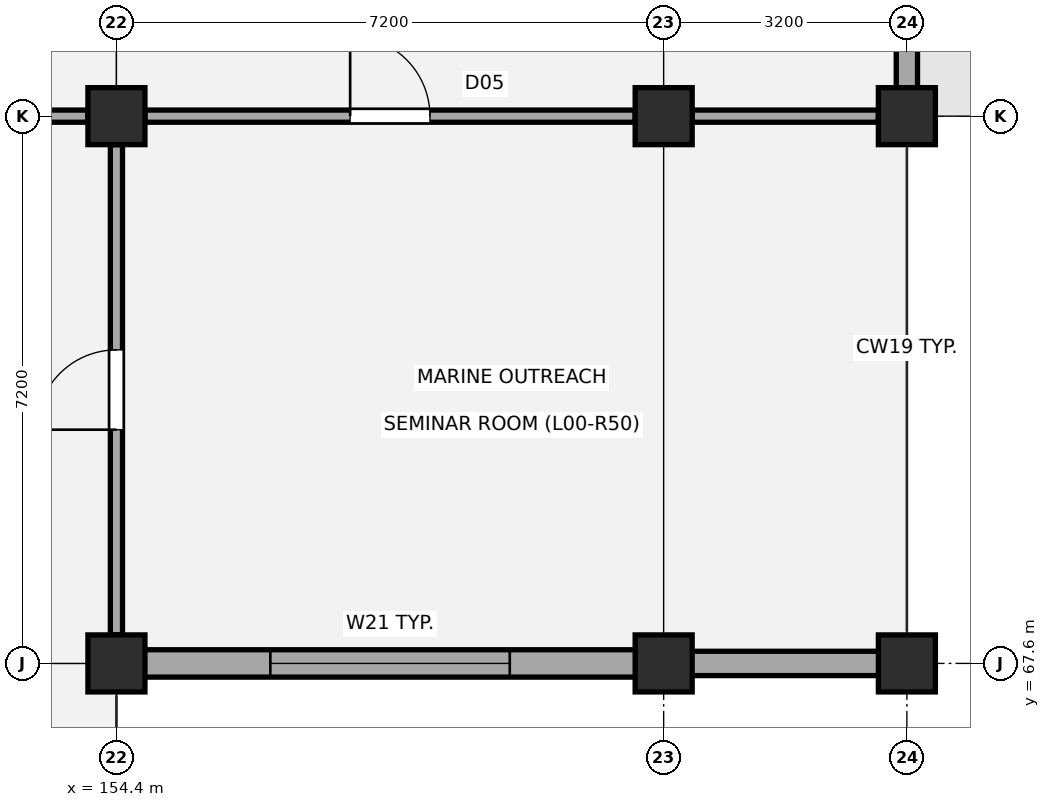
"""IFC4 building model, lengths in metres.
Left out: names, types, materials, properties, quantities, classifications, styles, units other than length and angle.
Written with IfcOpenShell. Run it as: python <this file> out.ifc"""

import sys

from ifc_helpers import new_model, si_unit, direction, frame, frame_2d, origin, origin_2d, place, context, subcontext, project, spatial, rectangle, circle, extrude, element, fill, save


model = new_model("IFC4")
c1 = context("Model", 3, precision=1e-05, world=origin(), true_north=direction((0.0, 1.0)))
c2 = subcontext(c1, "Body", "Model", "MODEL_VIEW")
j1 = project(units=[si_unit("LENGTHUNIT", "METRE"), si_unit("PLANEANGLEUNIT", "RADIAN")], contexts=[c1])
p1 = place(None, origin())
s1 = spatial("IfcSite", under=j1, at=p1, CompositionType="ELEMENT")
p2 = place(p1, origin())
s2 = spatial("IfcBuilding", under=s1, at=p2, CompositionType="ELEMENT")
p3 = place(p2, origin())
s3 = spatial("IfcBuildingStorey", under=s2, at=p3, CompositionType="ELEMENT", Elevation=0.0)
for number, where, z_axis, x_axis in (
    (1, (154.4, 67.6, -0.35), (0.0, 0.0, 1.0), (1.0, 0.0, 0.0)),
    (2, (154.4, 74.8, -0.35), (0.0, 0.0, 1.0), (1.0, 0.0, 0.0)),
    (3, (161.6, 67.6, -0.35), (0.0, 0.0, 1.0), (1.0, 0.0, 0.0)),
    (4, (161.6, 74.8, -0.35), (0.0, 0.0, 1.0), (1.0, 0.0, 0.0)),
    (5, (164.8, 67.6, -0.35), (0.0, 0.0, 1.0), (1.0, 0.0, 0.0)),
    (6, (164.8, 74.8, -0.35), (0.0, 0.0, 1.0), (1.0, 0.0, 0.0)),
):
    element("IfcColumn", number, at=place(p3, frame(where, z_axis=z_axis, x_axis=x_axis)), inside=s3, PredefinedType="COLUMN", context=c2, shape_type="SweptSolid", body=[
        extrude(circle(Radius=0.375, at=origin_2d()), origin(), (0.0, 0.0, 1.0), 5.03),
    ])
p4 = place(p3, frame((161.29, 67.6, 0.0), z_axis=(0.0, 0.0, 1.0), x_axis=(-1.0, 0.0, 0.0)))
e7 = element("IfcWall", 7, at=p4, inside=s3, PredefinedType="STANDARD", context=c2, shape_type="SweptSolid", body=[
    extrude(rectangle(XDim=6.58, YDim=0.36, at=frame_2d((3.29, 0.0))), origin(), (0.0, 0.0, 1.0), 3.75),
])
p5 = place(p4, frame((1.715, 0.0, 0.95)))
e8 = element("IfcOpeningElement", 8, at=p5, cuts=e7, PredefinedType="OPENING", context=c2, shape_type="SweptSolid", body=[
    extrude(rectangle(XDim=3.15, YDim=1.9, at=frame_2d((1.575, 0.95))), frame((0.0, 0.19, 0.0), z_axis=(0.0, -1.0, 0.0), x_axis=(1.0, 0.0, 0.0)), (0.0, 0.0, 1.0), 0.38),
])
p6 = place(p3, frame((164.49, 67.6, 0.0), z_axis=(0.0, 0.0, 1.0), x_axis=(-1.0, 0.0, 0.0)))
e9 = element("IfcWall", 9, at=p6, inside=s3, PredefinedType="STANDARD", context=c2, shape_type="SweptSolid", body=[
    extrude(rectangle(XDim=2.58, YDim=0.32, at=frame_2d((1.29, 0.0))), origin(), (0.0, 0.0, 1.0), 3.75),
])
p7 = place(p3, frame((164.8, 81.69, 0.0), z_axis=(0.0, 0.0, 1.0), x_axis=(0.0, -1.0, 0.0)))
e10 = element("IfcWall", 10, at=p7, inside=s3, PredefinedType="STANDARD", context=c2, shape_type="SweptSolid", body=[
    extrude(rectangle(XDim=6.58, YDim=0.28, at=frame_2d((3.29, 0.0))), origin(), (0.0, 0.0, 1.0), 3.75),
])
p8 = place(p7, frame((2.08, 0.0, 0.0)))
e11 = element("IfcOpeningElement", 11, at=p8, cuts=e10, PredefinedType="OPENING", context=c2, shape_type="SweptSolid", body=[
    extrude(rectangle(XDim=2.42, YDim=2.42, at=frame_2d((1.21, 1.21))), frame((0.0, 0.15, 0.0), z_axis=(0.0, -1.0, 0.0), x_axis=(1.0, 0.0, 0.0)), (0.0, 0.0, 1.0), 0.3),
])
p9 = place(p3, frame((154.4, 67.975, 0.0), z_axis=(0.0, 0.0, 1.0), x_axis=(0.0, 1.0, 0.0)))
e12 = element("IfcWall", 12, at=p9, inside=s3, PredefinedType="PARTITIONING", context=c2, shape_type="SweptSolid", body=[
    extrude(rectangle(XDim=6.45, YDim=0.16, at=frame_2d((3.225, 0.0))), origin(), (0.0, 0.0, 1.0), 3.62),
])
p10 = place(p9, frame((2.7, 0.0, 0.0)))
e13 = element("IfcOpeningElement", 13, at=p10, cuts=e12, PredefinedType="OPENING", context=c2, shape_type="SweptSolid", body=[
    extrude(rectangle(XDim=1.05, YDim=2.14, at=frame_2d((0.525, 1.07))), frame((0.0, 0.09, 0.0), z_axis=(0.0, -1.0, 0.0), x_axis=(1.0, 0.0, 0.0)), (0.0, 0.0, 1.0), 0.18),
])
p11 = place(p3, frame((147.6, 74.8, 0.0), z_axis=(0.0, 0.0, 1.0), x_axis=(1.0, 0.0, 0.0)))
e14 = element("IfcWall", 14, at=p11, inside=s3, PredefinedType="PARTITIONING", context=c2, shape_type="SweptSolid", body=[
    extrude(rectangle(XDim=6.425, YDim=0.16, at=frame_2d((3.212, 0.0))), origin(), (0.0, 0.0, 1.0), 3.52),
])
p12 = place(p11, frame((2.633, 0.0, 0.0)))
e15 = element("IfcOpeningElement", 15, at=p12, cuts=e14, PredefinedType="OPENING", context=c2, shape_type="SweptSolid", body=[
    extrude(rectangle(XDim=1.16, YDim=2.18, at=frame_2d((0.58, 1.09))), frame((0.0, 0.09, 0.0), z_axis=(0.0, -1.0, 0.0), x_axis=(1.0, 0.0, 0.0)), (0.0, 0.0, 1.0), 0.18),
])
p13 = place(p3, frame((154.775, 74.8, 0.0), z_axis=(0.0, 0.0, 1.0), x_axis=(1.0, 0.0, 0.0)))
e16 = element("IfcWall", 16, at=p13, inside=s3, PredefinedType="PARTITIONING", context=c2, shape_type="SweptSolid", body=[
    extrude(rectangle(XDim=6.45, YDim=0.16, at=frame_2d((3.225, 0.0))), origin(), (0.0, 0.0, 1.0), 3.7),
])
p14 = place(p13, frame((2.7, 0.0, 0.0)))
e17 = element("IfcOpeningElement", 17, at=p14, cuts=e16, PredefinedType="OPENING", context=c2, shape_type="SweptSolid", body=[
    extrude(rectangle(XDim=1.05, YDim=2.14, at=frame_2d((0.525, 1.07))), frame((0.0, 0.09, 0.0), z_axis=(0.0, -1.0, 0.0), x_axis=(1.0, 0.0, 0.0)), (0.0, 0.0, 1.0), 0.18),
])
p15 = place(p3, frame((161.975, 74.8, 0.0), z_axis=(0.0, 0.0, 1.0), x_axis=(1.0, 0.0, 0.0)))
e18 = element("IfcWall", 18, at=p15, inside=s3, PredefinedType="PARTITIONING", context=c2, shape_type="SweptSolid", body=[
    extrude(rectangle(XDim=2.45, YDim=0.16, at=frame_2d((1.225, 0.0))), origin(), (0.0, 0.0, 1.0), 3.6),
])
p16 = place(p5, origin())
e19 = element("IfcWindow", 19, at=p16, inside=s3, PartitioningType="SINGLE_PANEL", PredefinedType="WINDOW", context=c2, shape_type="SweptSolid", body=[
    extrude(rectangle(XDim=3.15, YDim=1.9, at=frame_2d((1.575, 0.95))), frame((0.0, 0.03, 0.0), z_axis=(0.0, -1.0, 0.0), x_axis=(1.0, 0.0, 0.0)), (0.0, 0.0, 1.0), 0.06),
])
fill(e8, e19)
p17 = place(p14, origin())
e20 = element("IfcDoor", 20, at=p17, inside=s3, OperationType="SINGLE_SWING_LEFT", PredefinedType="DOOR", context=c2, shape_type="SweptSolid", body=[
    extrude(rectangle(XDim=1.05, YDim=2.14, at=frame_2d((0.525, 1.07))), frame((0.0, 0.025, 0.0), z_axis=(0.0, -1.0, 0.0), x_axis=(1.0, 0.0, 0.0)), (0.0, 0.0, 1.0), 0.05),
])
fill(e17, e20)
p18 = place(p10, origin())
e21 = element("IfcDoor", 21, at=p18, inside=s3, OperationType="SINGLE_SWING_LEFT", PredefinedType="DOOR", context=c2, shape_type="SweptSolid", body=[
    extrude(rectangle(XDim=1.05, YDim=2.14, at=frame_2d((0.525, 1.07))), frame((0.0, 0.025, 0.0), z_axis=(0.0, -1.0, 0.0), x_axis=(1.0, 0.0, 0.0)), (0.0, 0.0, 1.0), 0.05),
])
fill(e13, e21)
save(model, sys.argv[1])
